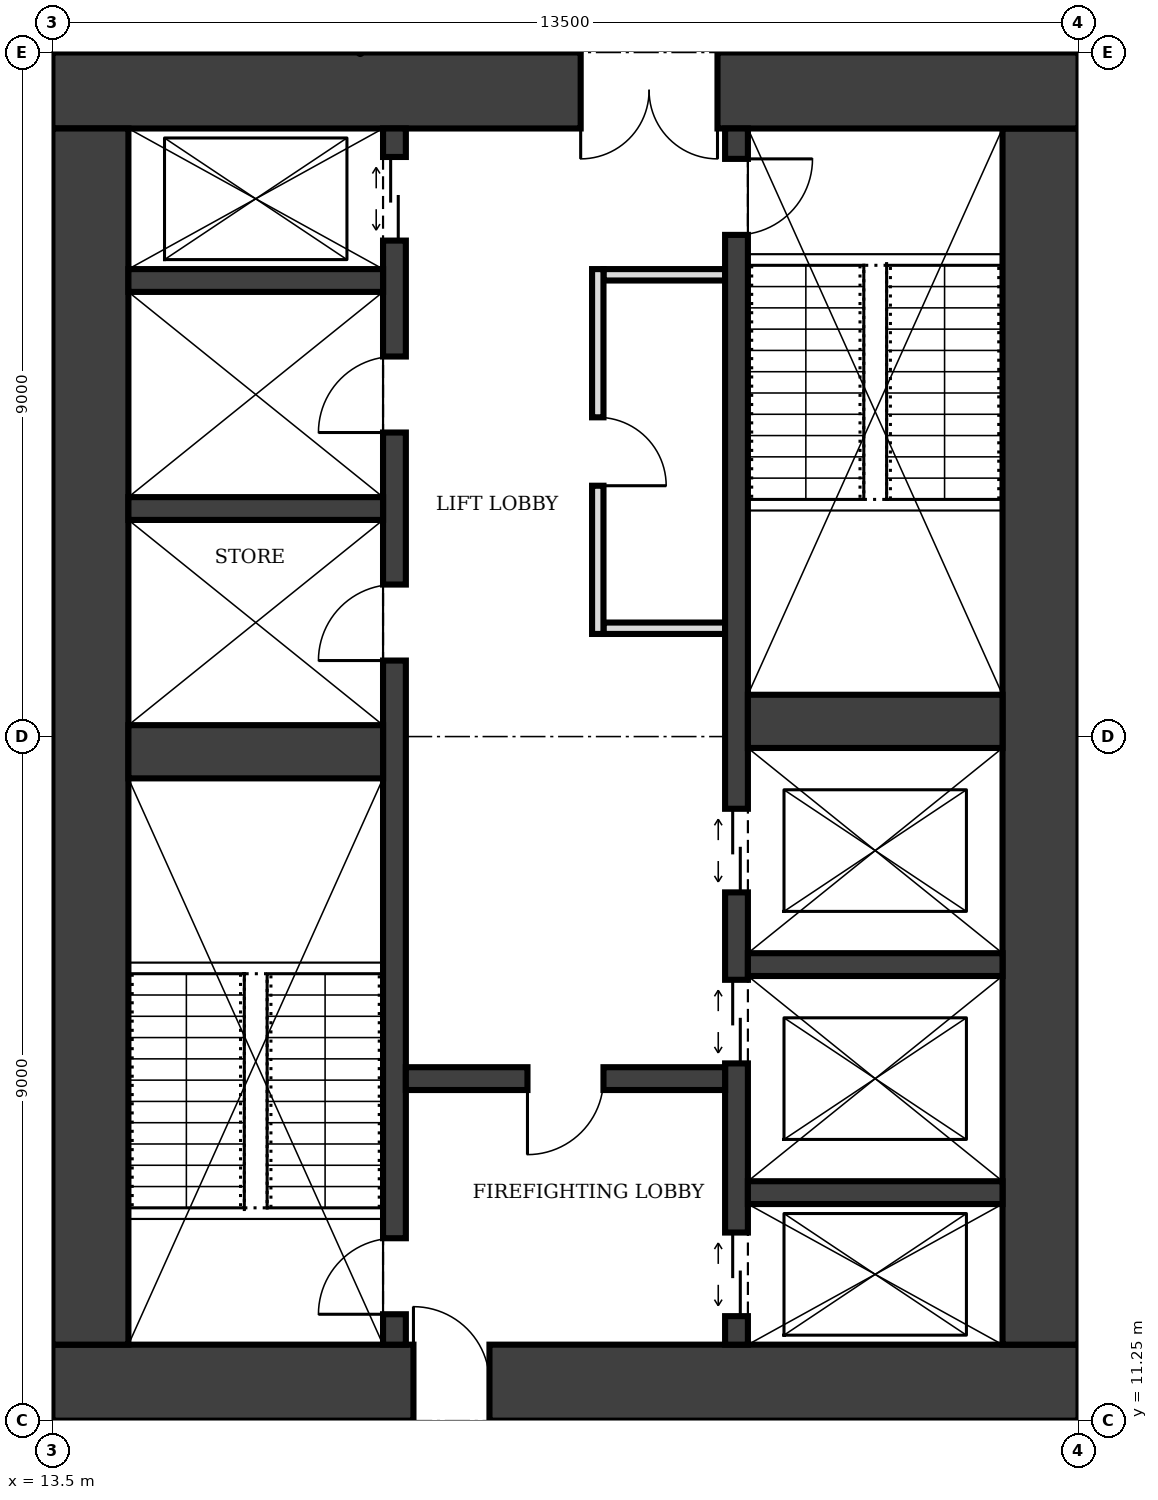
"""IFC4 building model, lengths in metres.
Left out: names, types, materials, properties, quantities, classifications, styles, units other than length and angle.
Written with IfcOpenShell. Run it as: python <this file> out.ifc"""

import sys

from ifc_helpers import new_model, si_unit, direction, frame, frame_2d, origin, place, context, subcontext, project, spatial, rectangle, extrude, element, fill, save


model = new_model("IFC4")
c1 = context("Model", 3, precision=1e-05, world=origin(), true_north=direction((0.0, 1.0)))
c2 = subcontext(c1, "Body", "Model", "MODEL_VIEW")
j1 = project(units=[si_unit("LENGTHUNIT", "METRE"), si_unit("PLANEANGLEUNIT", "RADIAN")], contexts=[c1])
p1 = place(None, origin())
s1 = spatial("IfcSite", under=j1, at=p1, CompositionType="ELEMENT")
p2 = place(p1, origin())
s2 = spatial("IfcBuilding", under=s1, at=p2, CompositionType="ELEMENT")
p3 = place(p2, frame((0.0, 0.0, 129.0)))
s3 = spatial("IfcBuildingStorey", under=s2, at=p3, CompositionType="ELEMENT", Elevation=129.0)
p4 = place(p3, frame((13.5, 11.75, 0.0), z_axis=(0.0, 0.0, 1.0), x_axis=(1.0, 0.0, 0.0)))
e1 = element("IfcWall", 1, at=p4, inside=s3, PredefinedType="SHEAR", context=c2, shape_type="SweptSolid", body=[
    extrude(rectangle(XDim=13.5, YDim=1.0, at=frame_2d((6.75, 0.0))), origin(), (0.0, 0.0, 1.0), 4.0),
])
p5 = place(p4, frame((4.75, 0.0, 0.0)))
e2 = element("IfcOpeningElement", 2, at=p5, cuts=e1, PredefinedType="OPENING", context=c2, shape_type="SweptSolid", body=[
    extrude(rectangle(XDim=1.0, YDim=2.1, at=frame_2d((0.5, 1.05))), frame((0.0, 0.51, 0.0), z_axis=(0.0, -1.0, 0.0), x_axis=(1.0, 0.0, 0.0)), (0.0, 0.0, 1.0), 1.02),
])
p6 = place(p3, frame((26.5, 12.25, 0.0), z_axis=(0.0, 0.0, 1.0), x_axis=(0.0, 1.0, 0.0)))
e3 = element("IfcWall", 3, at=p6, inside=s3, PredefinedType="SHEAR", context=c2, shape_type="SweptSolid", body=[
    extrude(rectangle(XDim=16.0, YDim=1.0, at=frame_2d((8.0, 0.0))), origin(), (0.0, 0.0, 1.0), 4.0),
])
p7 = place(p3, frame((27.0, 28.75, 0.0), z_axis=(0.0, 0.0, 1.0), x_axis=(-1.0, 0.0, 0.0)))
e4 = element("IfcWall", 4, at=p7, inside=s3, PredefinedType="SHEAR", context=c2, shape_type="SweptSolid", body=[
    extrude(rectangle(XDim=13.5, YDim=1.0, at=frame_2d((6.75, 0.0))), origin(), (0.0, 0.0, 1.0), 4.0),
])
p8 = place(p7, frame((4.75, 0.0, 0.0)))
e5 = element("IfcOpeningElement", 5, at=p8, cuts=e4, PredefinedType="OPENING", context=c2, shape_type="SweptSolid", body=[
    extrude(rectangle(XDim=1.8, YDim=2.1, at=frame_2d((0.9, 1.05))), frame((0.0, 0.51, 0.0), z_axis=(0.0, -1.0, 0.0), x_axis=(1.0, 0.0, 0.0)), (0.0, 0.0, 1.0), 1.02),
])
p9 = place(p3, frame((14.0, 28.25, 0.0), z_axis=(0.0, 0.0, 1.0), x_axis=(0.0, -1.0, 0.0)))
e6 = element("IfcWall", 6, at=p9, inside=s3, PredefinedType="SHEAR", context=c2, shape_type="SweptSolid", body=[
    extrude(rectangle(XDim=16.0, YDim=1.0, at=frame_2d((8.0, 0.0))), origin(), (0.0, 0.0, 1.0), 4.0),
])
p10 = place(p3, frame((18.0, 12.25, 0.0), z_axis=(0.0, 0.0, 1.0), x_axis=(0.0, 1.0, 0.0)))
e7 = element("IfcWall", 7, at=p10, inside=s3, PredefinedType="SHEAR", context=c2, shape_type="SweptSolid", body=[
    extrude(rectangle(XDim=16.0, YDim=0.3, at=frame_2d((8.0, 0.0))), origin(), (0.0, 0.0, 1.0), 4.0),
])
p11 = place(p10, frame((0.4, 0.0, 0.0)))
e8 = element("IfcOpeningElement", 8, at=p11, cuts=e7, PredefinedType="OPENING", context=c2, shape_type="SweptSolid", body=[
    extrude(rectangle(XDim=1.0, YDim=2.1, at=frame_2d((0.5, 1.05))), frame((0.0, 0.16, 0.0), z_axis=(0.0, -1.0, 0.0), x_axis=(1.0, 0.0, 0.0)), (0.0, 0.0, 1.0), 0.32),
])
p12 = place(p10, frame((14.525, 0.0, 0.0)))
e9 = element("IfcOpeningElement", 9, at=p12, cuts=e7, PredefinedType="OPENING", context=c2, shape_type="SweptSolid", body=[
    extrude(rectangle(XDim=1.1, YDim=2.1, at=frame_2d((0.55, 1.05))), frame((0.0, 0.16, 0.0), z_axis=(0.0, -1.0, 0.0), x_axis=(1.0, 0.0, 0.0)), (0.0, 0.0, 1.0), 0.32),
])
p13 = place(p10, frame((9.0, 0.0, 0.0)))
e10 = element("IfcOpeningElement", 10, at=p13, cuts=e7, PredefinedType="OPENING", context=c2, shape_type="SweptSolid", body=[
    extrude(rectangle(XDim=1.0, YDim=2.1, at=frame_2d((0.5, 1.05))), frame((0.0, 0.16, 0.0), z_axis=(0.0, -1.0, 0.0), x_axis=(1.0, 0.0, 0.0)), (0.0, 0.0, 1.0), 0.32),
])
p14 = place(p10, frame((12.0, 0.0, 0.0)))
e11 = element("IfcOpeningElement", 11, at=p14, cuts=e7, PredefinedType="OPENING", context=c2, shape_type="SweptSolid", body=[
    extrude(rectangle(XDim=1.0, YDim=2.1, at=frame_2d((0.5, 1.05))), frame((0.0, 0.16, 0.0), z_axis=(0.0, -1.0, 0.0), x_axis=(1.0, 0.0, 0.0)), (0.0, 0.0, 1.0), 0.32),
])
p15 = place(p3, frame((22.5, 12.25, 0.0), z_axis=(0.0, 0.0, 1.0), x_axis=(0.0, 1.0, 0.0)))
e12 = element("IfcWall", 12, at=p15, inside=s3, PredefinedType="SHEAR", context=c2, shape_type="SweptSolid", body=[
    extrude(rectangle(XDim=16.0, YDim=0.3, at=frame_2d((8.0, 0.0))), origin(), (0.0, 0.0, 1.0), 4.0),
])
p16 = place(p15, frame((14.6, 0.0, 0.0)))
e13 = element("IfcOpeningElement", 13, at=p16, cuts=e12, PredefinedType="OPENING", context=c2, shape_type="SweptSolid", body=[
    extrude(rectangle(XDim=1.0, YDim=2.1, at=frame_2d((0.5, 1.05))), frame((0.0, 0.16, 0.0), z_axis=(0.0, -1.0, 0.0), x_axis=(1.0, 0.0, 0.0)), (0.0, 0.0, 1.0), 0.32),
])
p17 = place(p15, frame((0.375, 0.0, 0.0)))
e14 = element("IfcOpeningElement", 14, at=p17, cuts=e12, PredefinedType="OPENING", context=c2, shape_type="SweptSolid", body=[
    extrude(rectangle(XDim=1.1, YDim=2.1, at=frame_2d((0.55, 1.05))), frame((0.0, 0.16, 0.0), z_axis=(0.0, -1.0, 0.0), x_axis=(1.0, 0.0, 0.0)), (0.0, 0.0, 1.0), 0.32),
])
p18 = place(p15, frame((3.7, 0.0, 0.0)))
e15 = element("IfcOpeningElement", 15, at=p18, cuts=e12, PredefinedType="OPENING", context=c2, shape_type="SweptSolid", body=[
    extrude(rectangle(XDim=1.1, YDim=2.1, at=frame_2d((0.55, 1.05))), frame((0.0, 0.16, 0.0), z_axis=(0.0, -1.0, 0.0), x_axis=(1.0, 0.0, 0.0)), (0.0, 0.0, 1.0), 0.32),
])
p19 = place(p15, frame((5.95, 0.0, 0.0)))
e16 = element("IfcOpeningElement", 16, at=p19, cuts=e12, PredefinedType="OPENING", context=c2, shape_type="SweptSolid", body=[
    extrude(rectangle(XDim=1.1, YDim=2.1, at=frame_2d((0.55, 1.05))), frame((0.0, 0.16, 0.0), z_axis=(0.0, -1.0, 0.0), x_axis=(1.0, 0.0, 0.0)), (0.0, 0.0, 1.0), 0.32),
])
p20 = place(p3, frame((14.5, 20.05, 0.0), z_axis=(0.0, 0.0, 1.0), x_axis=(1.0, 0.0, 0.0)))
e17 = element("IfcWall", 17, at=p20, inside=s3, PredefinedType="SHEAR", context=c2, shape_type="SweptSolid", body=[
    extrude(rectangle(XDim=3.35, YDim=0.7, at=frame_2d((1.675, 0.0))), origin(), (0.0, 0.0, 1.0), 4.0),
])
p21 = place(p3, frame((18.15, 15.75, 0.0), z_axis=(0.0, 0.0, 1.0), x_axis=(1.0, 0.0, 0.0)))
e18 = element("IfcWall", 18, at=p21, inside=s3, PredefinedType="SHEAR", context=c2, shape_type="SweptSolid", body=[
    extrude(rectangle(XDim=4.2, YDim=0.3, at=frame_2d((2.1, 0.0))), origin(), (0.0, 0.0, 1.0), 4.0),
])
p22 = place(p21, frame((1.6, 0.0, 0.0)))
e19 = element("IfcOpeningElement", 19, at=p22, cuts=e18, PredefinedType="OPENING", context=c2, shape_type="SweptSolid", body=[
    extrude(rectangle(XDim=1.0, YDim=2.1, at=frame_2d((0.5, 1.05))), frame((0.0, 0.16, 0.0), z_axis=(0.0, -1.0, 0.0), x_axis=(1.0, 0.0, 0.0)), (0.0, 0.0, 1.0), 0.32),
])
for number, where, z_axis, x_axis in (
    (20, (22.65, 14.25, 0.0), (0.0, 0.0, 1.0), (1.0, 0.0, 0.0)),
    (21, (22.65, 17.25, 0.0), (0.0, 0.0, 1.0), (1.0, 0.0, 0.0)),
):
    element("IfcWall", number, at=place(p3, frame(where, z_axis=z_axis, x_axis=x_axis)), inside=s3, PredefinedType="SHEAR", context=c2, shape_type="SweptSolid", body=[
        extrude(rectangle(XDim=3.35, YDim=0.3, at=frame_2d((1.675, 0.0))), origin(), (0.0, 0.0, 1.0), 4.0),
    ])
p23 = place(p3, frame((22.65, 20.45, 0.0), z_axis=(0.0, 0.0, 1.0), x_axis=(1.0, 0.0, 0.0)))
e22 = element("IfcWall", 22, at=p23, inside=s3, PredefinedType="SHEAR", context=c2, shape_type="SweptSolid", body=[
    extrude(rectangle(XDim=3.35, YDim=0.7, at=frame_2d((1.675, 0.0))), origin(), (0.0, 0.0, 1.0), 4.0),
])
for number, where, z_axis, x_axis in (
    (23, (14.5, 23.25, 0.0), (0.0, 0.0, 1.0), (1.0, 0.0, 0.0)),
    (24, (14.5, 26.25, 0.0), (0.0, 0.0, 1.0), (1.0, 0.0, 0.0)),
):
    element("IfcWall", number, at=place(p3, frame(where, z_axis=z_axis, x_axis=x_axis)), inside=s3, PredefinedType="SHEAR", context=c2, shape_type="SweptSolid", body=[
        extrude(rectangle(XDim=3.35, YDim=0.3, at=frame_2d((1.675, 0.0))), origin(), (0.0, 0.0, 1.0), 4.0),
    ])
p24 = place(p3, frame((20.675, 21.6, 0.0), z_axis=(0.0, 0.0, 1.0), x_axis=(0.0, 1.0, 0.0)))
e25 = element("IfcWall", 25, at=p24, inside=s3, PredefinedType="PARTITIONING", context=c2, shape_type="SweptSolid", body=[
    extrude(rectangle(XDim=4.8, YDim=0.15, at=frame_2d((2.4, 0.0))), origin(), (0.0, 0.0, 1.0), 3.75),
])
p25 = place(p24, frame((1.95, 0.0, 0.0)))
e26 = element("IfcOpeningElement", 26, at=p25, cuts=e25, PredefinedType="OPENING", context=c2, shape_type="SweptSolid", body=[
    extrude(rectangle(XDim=0.9, YDim=2.1, at=frame_2d((0.45, 1.05))), frame((0.0, 0.085, 0.0), z_axis=(0.0, -1.0, 0.0), x_axis=(1.0, 0.0, 0.0)), (0.0, 0.0, 1.0), 0.17),
])
for number, where, z_axis, x_axis in (
    (27, (20.75, 21.675, 0.0), (0.0, 0.0, 1.0), (1.0, 0.0, 0.0)),
    (28, (20.75, 26.325, 0.0), (0.0, 0.0, 1.0), (1.0, 0.0, 0.0)),
):
    element("IfcWall", number, at=place(p3, frame(where, z_axis=z_axis, x_axis=x_axis)), inside=s3, PredefinedType="PARTITIONING", context=c2, shape_type="SweptSolid", body=[
        extrude(rectangle(XDim=1.6, YDim=0.15, at=frame_2d((0.8, 0.0))), origin(), (0.0, 0.0, 1.0), 3.75),
    ])
p26 = place(p5, origin())
e29 = element("IfcDoor", 29, at=p26, inside=s3, OperationType="SINGLE_SWING_LEFT", PredefinedType="DOOR", context=c2, shape_type="SweptSolid", body=[
    extrude(rectangle(XDim=1.0, YDim=2.1, at=frame_2d((0.5, 1.05))), frame((0.0, 0.025, 0.0), z_axis=(0.0, -1.0, 0.0), x_axis=(1.0, 0.0, 0.0)), (0.0, 0.0, 1.0), 0.05),
])
fill(e2, e29)
p27 = place(p8, origin())
e30 = element("IfcDoor", 30, at=p27, inside=s3, OperationType="DOUBLE_DOOR_SINGLE_SWING", PredefinedType="DOOR", context=c2, shape_type="SweptSolid", body=[
    extrude(rectangle(XDim=1.8, YDim=2.1, at=frame_2d((0.9, 1.05))), frame((0.0, 0.025, 0.0), z_axis=(0.0, -1.0, 0.0), x_axis=(1.0, 0.0, 0.0)), (0.0, 0.0, 1.0), 0.05),
])
fill(e5, e30)
p28 = place(p22, frame((1.0, 0.0, 0.0), z_axis=(0.0, 0.0, 1.0), x_axis=(-1.0, 0.0, 0.0)))
e31 = element("IfcDoor", 31, at=p28, inside=s3, OperationType="SINGLE_SWING_RIGHT", PredefinedType="DOOR", context=c2, shape_type="SweptSolid", body=[
    extrude(rectangle(XDim=1.0, YDim=2.1, at=frame_2d((0.5, 1.05))), frame((0.0, 0.025, 0.0), z_axis=(0.0, -1.0, 0.0), x_axis=(1.0, 0.0, 0.0)), (0.0, 0.0, 1.0), 0.05),
])
fill(e19, e31)
p29 = place(p11, origin())
e32 = element("IfcDoor", 32, at=p29, inside=s3, OperationType="SINGLE_SWING_LEFT", PredefinedType="DOOR", context=c2, shape_type="SweptSolid", body=[
    extrude(rectangle(XDim=1.0, YDim=2.1, at=frame_2d((0.5, 1.05))), frame((0.0, 0.025, 0.0), z_axis=(0.0, -1.0, 0.0), x_axis=(1.0, 0.0, 0.0)), (0.0, 0.0, 1.0), 0.05),
])
fill(e8, e32)
p30 = place(p16, frame((1.0, 0.0, 0.0), z_axis=(0.0, 0.0, 1.0), x_axis=(-1.0, 0.0, 0.0)))
e33 = element("IfcDoor", 33, at=p30, inside=s3, OperationType="SINGLE_SWING_LEFT", PredefinedType="DOOR", context=c2, shape_type="SweptSolid", body=[
    extrude(rectangle(XDim=1.0, YDim=2.1, at=frame_2d((0.5, 1.05))), frame((0.0, 0.025, 0.0), z_axis=(0.0, -1.0, 0.0), x_axis=(1.0, 0.0, 0.0)), (0.0, 0.0, 1.0), 0.05),
])
fill(e13, e33)
p31 = place(p17, origin())
e34 = element("IfcDoor", 34, at=p31, inside=s3, OperationType="DOUBLE_DOOR_SLIDING", PredefinedType="DOOR", context=c2, shape_type="SweptSolid", body=[
    extrude(rectangle(XDim=1.1, YDim=2.1, at=frame_2d((0.55, 1.05))), frame((0.0, 0.025, 0.0), z_axis=(0.0, -1.0, 0.0), x_axis=(1.0, 0.0, 0.0)), (0.0, 0.0, 1.0), 0.05),
])
fill(e14, e34)
p32 = place(p12, origin())
e35 = element("IfcDoor", 35, at=p32, inside=s3, OperationType="DOUBLE_DOOR_SLIDING", PredefinedType="DOOR", context=c2, shape_type="SweptSolid", body=[
    extrude(rectangle(XDim=1.1, YDim=2.1, at=frame_2d((0.55, 1.05))), frame((0.0, 0.025, 0.0), z_axis=(0.0, -1.0, 0.0), x_axis=(1.0, 0.0, 0.0)), (0.0, 0.0, 1.0), 0.05),
])
fill(e9, e35)
p33 = place(p18, origin())
e36 = element("IfcDoor", 36, at=p33, inside=s3, OperationType="DOUBLE_DOOR_SLIDING", PredefinedType="DOOR", context=c2, shape_type="SweptSolid", body=[
    extrude(rectangle(XDim=1.1, YDim=2.1, at=frame_2d((0.55, 1.05))), frame((0.0, 0.025, 0.0), z_axis=(0.0, -1.0, 0.0), x_axis=(1.0, 0.0, 0.0)), (0.0, 0.0, 1.0), 0.05),
])
fill(e15, e36)
p34 = place(p19, origin())
e37 = element("IfcDoor", 37, at=p34, inside=s3, OperationType="DOUBLE_DOOR_SLIDING", PredefinedType="DOOR", context=c2, shape_type="SweptSolid", body=[
    extrude(rectangle(XDim=1.1, YDim=2.1, at=frame_2d((0.55, 1.05))), frame((0.0, 0.025, 0.0), z_axis=(0.0, -1.0, 0.0), x_axis=(1.0, 0.0, 0.0)), (0.0, 0.0, 1.0), 0.05),
])
fill(e16, e37)
p35 = place(p25, frame((0.9, 0.0, 0.0), z_axis=(0.0, 0.0, 1.0), x_axis=(-1.0, 0.0, 0.0)))
e38 = element("IfcDoor", 38, at=p35, inside=s3, OperationType="SINGLE_SWING_RIGHT", PredefinedType="DOOR", context=c2, shape_type="SweptSolid", body=[
    extrude(rectangle(XDim=0.9, YDim=2.1, at=frame_2d((0.45, 1.05))), frame((0.0, 0.025, 0.0), z_axis=(0.0, -1.0, 0.0), x_axis=(1.0, 0.0, 0.0)), (0.0, 0.0, 1.0), 0.05),
])
fill(e26, e38)
p36 = place(p13, origin())
e39 = element("IfcDoor", 39, at=p36, inside=s3, OperationType="SINGLE_SWING_LEFT", PredefinedType="DOOR", context=c2, shape_type="SweptSolid", body=[
    extrude(rectangle(XDim=1.0, YDim=2.1, at=frame_2d((0.5, 1.05))), frame((0.0, 0.025, 0.0), z_axis=(0.0, -1.0, 0.0), x_axis=(1.0, 0.0, 0.0)), (0.0, 0.0, 1.0), 0.05),
])
fill(e10, e39)
p37 = place(p14, origin())
e40 = element("IfcDoor", 40, at=p37, inside=s3, OperationType="SINGLE_SWING_LEFT", PredefinedType="DOOR", context=c2, shape_type="SweptSolid", body=[
    extrude(rectangle(XDim=1.0, YDim=2.1, at=frame_2d((0.5, 1.05))), frame((0.0, 0.025, 0.0), z_axis=(0.0, -1.0, 0.0), x_axis=(1.0, 0.0, 0.0)), (0.0, 0.0, 1.0), 0.05),
])
fill(e11, e40)
save(model, sys.argv[1])
